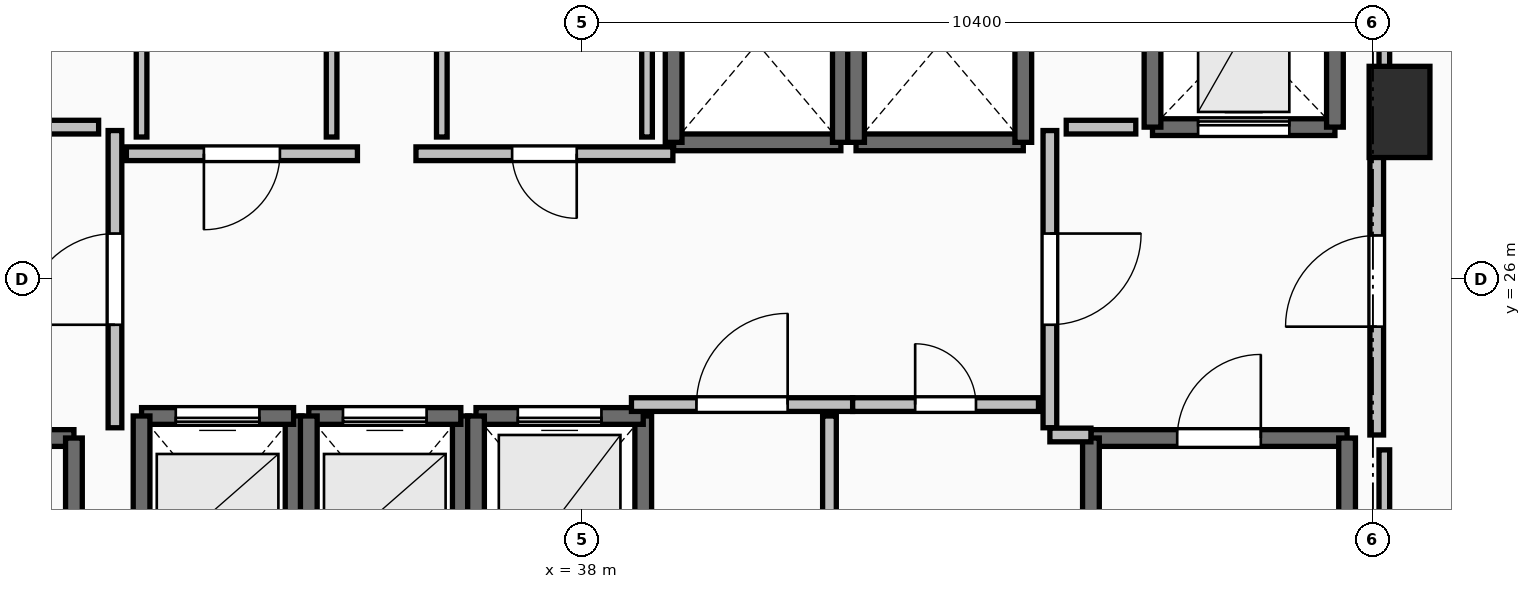
"""IFC4 building model, lengths in metres.
Left out: names, types, materials, properties, quantities, classifications, styles, units other than length and angle.
Written with IfcOpenShell. Run it as: python <this file> out.ifc"""

import sys

from ifc_helpers import new_model, si_unit, direction, frame, frame_2d, origin, origin_2d, place, context, subcontext, project, spatial, rectangle, extrude, element, fill, save


model = new_model("IFC4")
c1 = context("Model", 3, precision=1e-05, world=origin(), true_north=direction((0.0, 1.0)))
c2 = subcontext(c1, "Body", "Model", "MODEL_VIEW")
j1 = project(units=[si_unit("LENGTHUNIT", "METRE"), si_unit("PLANEANGLEUNIT", "RADIAN")], contexts=[c1])
p1 = place(None, origin())
s1 = spatial("IfcSite", under=j1, at=p1, CompositionType="ELEMENT")
p2 = place(p1, origin())
s2 = spatial("IfcBuilding", under=s1, at=p2, CompositionType="ELEMENT")
p3 = place(p2, frame((0.0, 0.0, 146.6)))
s3 = spatial("IfcBuildingStorey", under=s2, at=p3, CompositionType="ELEMENT", Elevation=146.6)
p4 = place(p3, frame((48.75, 28.2, 0.0), z_axis=(0.0, 0.0, 1.0), x_axis=(1.0, 0.0, 0.0)))
e1 = element("IfcColumn", 1, at=p4, inside=s3, PredefinedType="PILASTER", context=c2, shape_type="SweptSolid", body=[
    extrude(rectangle(XDim=0.8, YDim=1.2, at=origin_2d()), origin(), (0.0, 0.0, 1.0), 3.5),
])
p5 = place(p3, frame((27.94, 23.91, 0.0), z_axis=(0.0, 0.0, 1.0), x_axis=(1.0, 0.0, 0.0)))
e2 = element("IfcWall", 2, at=p5, inside=s3, PredefinedType="SOLIDWALL", context=c2, shape_type="SweptSolid", body=[
    extrude(rectangle(XDim=3.37, YDim=0.22, at=frame_2d((1.685, 0.0))), origin(), (0.0, 0.0, 1.0), 3.24),
])
p6 = place(p5, frame((1.135, 0.0, 0.0)))
e3 = element("IfcOpeningElement", 3, at=p6, cuts=e2, PredefinedType="OPENING", context=c2, shape_type="SweptSolid", body=[
    extrude(rectangle(XDim=1.1, YDim=2.15, at=frame_2d((0.55, 1.075))), frame((0.0, 0.125, 0.0), z_axis=(0.0, -1.0, 0.0), x_axis=(1.0, 0.0, 0.0)), (0.0, 0.0, 1.0), 0.25),
])
p7 = place(p3, frame((31.31, 23.91, 0.0), z_axis=(0.0, 0.0, 1.0), x_axis=(0.0, -1.0, 0.0)))
e4 = element("IfcWall", 4, at=p7, inside=s3, PredefinedType="SOLIDWALL", context=c2, shape_type="SweptSolid", body=[
    extrude(rectangle(XDim=7.42, YDim=0.22, at=frame_2d((3.71, 0.0))), origin(), (0.0, 0.0, 1.0), 3.24),
])
p8 = place(p3, frame((44.69, 23.91, 0.0), z_axis=(0.0, 0.0, 1.0), x_axis=(1.0, 0.0, 0.0)))
e5 = element("IfcWall", 5, at=p8, inside=s3, PredefinedType="SOLIDWALL", context=c2, shape_type="SweptSolid", body=[
    extrude(rectangle(XDim=3.37, YDim=0.22, at=frame_2d((1.685, 0.0))), origin(), (0.0, 0.0, 1.0), 3.24),
])
p9 = place(p8, frame((1.135, 0.0, 0.0)))
e6 = element("IfcOpeningElement", 6, at=p9, cuts=e5, PredefinedType="OPENING", context=c2, shape_type="SweptSolid", body=[
    extrude(rectangle(XDim=1.1, YDim=2.15, at=frame_2d((0.55, 1.075))), frame((0.0, 0.125, 0.0), z_axis=(0.0, -1.0, 0.0), x_axis=(1.0, 0.0, 0.0)), (0.0, 0.0, 1.0), 0.25),
])
for number, where, z_axis, x_axis in (
    (7, (48.06, 23.91, 0.0), (0.0, 0.0, 1.0), (0.0, -1.0, 0.0)),
    (8, (44.69, 16.49, 0.0), (0.0, 0.0, 1.0), (0.0, 1.0, 0.0)),
):
    element("IfcWall", number, at=place(p3, frame(where, z_axis=z_axis, x_axis=x_axis)), inside=s3, PredefinedType="SOLIDWALL", context=c2, shape_type="SweptSolid", body=[
        extrude(rectangle(XDim=7.42, YDim=0.22, at=frame_2d((3.71, 0.0))), origin(), (0.0, 0.0, 1.0), 3.24),
    ])
p10 = place(p3, frame((34.2, 21.8, 0.0), z_axis=(0.0, 0.0, 1.0), x_axis=(0.0, 1.0, 0.0)))
e9 = element("IfcWall", 9, at=p10, inside=s3, PredefinedType="SOLIDWALL", context=c2, shape_type="SweptSolid", body=[
    extrude(rectangle(XDim=2.4, YDim=0.22, at=frame_2d((1.2, 0.0))), origin(), (0.0, 0.0, 1.0), 3.24),
])
p11 = place(p3, frame((34.2, 24.2, 0.0), z_axis=(0.0, 0.0, 1.0), x_axis=(-1.0, 0.0, 0.0)))
e10 = element("IfcWall", 10, at=p11, inside=s3, PredefinedType="SOLIDWALL", context=c2, shape_type="SweptSolid", body=[
    extrude(rectangle(XDim=2.0, YDim=0.22, at=frame_2d((1.0, 0.0))), origin(), (0.0, 0.0, 1.0), 3.24),
])
p12 = place(p11, frame((0.45, 0.0, 0.0)))
e11 = element("IfcOpeningElement", 11, at=p12, cuts=e10, PredefinedType="OPENING", context=c2, shape_type="SweptSolid", body=[
    extrude(rectangle(XDim=1.1, YDim=2.2, at=frame_2d((0.55, 1.1))), frame((0.0, 0.125, 0.0), z_axis=(0.0, -1.0, 0.0), x_axis=(1.0, 0.0, 0.0)), (0.0, 0.0, 1.0), 0.25),
])
for number, where, z_axis, x_axis in (
    (12, (32.2, 24.2, 0.0), (0.0, 0.0, 1.0), (0.0, -1.0, 0.0)),
    (13, (36.4, 21.8, 0.0), (0.0, 0.0, 1.0), (0.0, 1.0, 0.0)),
):
    element("IfcWall", number, at=place(p3, frame(where, z_axis=z_axis, x_axis=x_axis)), inside=s3, PredefinedType="SOLIDWALL", context=c2, shape_type="SweptSolid", body=[
        extrude(rectangle(XDim=2.4, YDim=0.22, at=frame_2d((1.2, 0.0))), origin(), (0.0, 0.0, 1.0), 3.24),
    ])
p13 = place(p3, frame((36.4, 24.2, 0.0), z_axis=(0.0, 0.0, 1.0), x_axis=(-1.0, 0.0, 0.0)))
e14 = element("IfcWall", 14, at=p13, inside=s3, PredefinedType="SOLIDWALL", context=c2, shape_type="SweptSolid", body=[
    extrude(rectangle(XDim=2.0, YDim=0.22, at=frame_2d((1.0, 0.0))), origin(), (0.0, 0.0, 1.0), 3.24),
])
p14 = place(p13, frame((0.45, 0.0, 0.0)))
e15 = element("IfcOpeningElement", 15, at=p14, cuts=e14, PredefinedType="OPENING", context=c2, shape_type="SweptSolid", body=[
    extrude(rectangle(XDim=1.1, YDim=2.2, at=frame_2d((0.55, 1.1))), frame((0.0, 0.125, 0.0), z_axis=(0.0, -1.0, 0.0), x_axis=(1.0, 0.0, 0.0)), (0.0, 0.0, 1.0), 0.25),
])
p15 = place(p3, frame((34.4, 24.2, 0.0), z_axis=(0.0, 0.0, 1.0), x_axis=(0.0, -1.0, 0.0)))
e16 = element("IfcWall", 16, at=p15, inside=s3, PredefinedType="SOLIDWALL", context=c2, shape_type="SweptSolid", body=[
    extrude(rectangle(XDim=2.4, YDim=0.22, at=frame_2d((1.2, 0.0))), origin(), (0.0, 0.0, 1.0), 3.24),
])
p16 = place(p3, frame((38.8, 21.6, 0.0), z_axis=(0.0, 0.0, 1.0), x_axis=(0.0, 1.0, 0.0)))
e17 = element("IfcWall", 17, at=p16, inside=s3, PredefinedType="SOLIDWALL", context=c2, shape_type="SweptSolid", body=[
    extrude(rectangle(XDim=2.6, YDim=0.22, at=frame_2d((1.3, 0.0))), origin(), (0.0, 0.0, 1.0), 3.24),
])
p17 = place(p3, frame((38.8, 24.2, 0.0), z_axis=(0.0, 0.0, 1.0), x_axis=(-1.0, 0.0, 0.0)))
e18 = element("IfcWall", 18, at=p17, inside=s3, PredefinedType="SOLIDWALL", context=c2, shape_type="SweptSolid", body=[
    extrude(rectangle(XDim=2.2, YDim=0.22, at=frame_2d((1.1, 0.0))), origin(), (0.0, 0.0, 1.0), 3.24),
])
p18 = place(p17, frame((0.55, 0.0, 0.0)))
e19 = element("IfcOpeningElement", 19, at=p18, cuts=e18, PredefinedType="OPENING", context=c2, shape_type="SweptSolid", body=[
    extrude(rectangle(XDim=1.1, YDim=2.2, at=frame_2d((0.55, 1.1))), frame((0.0, 0.125, 0.0), z_axis=(0.0, -1.0, 0.0), x_axis=(1.0, 0.0, 0.0)), (0.0, 0.0, 1.0), 0.25),
])
p19 = place(p3, frame((36.6, 24.2, 0.0), z_axis=(0.0, 0.0, 1.0), x_axis=(0.0, -1.0, 0.0)))
e20 = element("IfcWall", 20, at=p19, inside=s3, PredefinedType="SOLIDWALL", context=c2, shape_type="SweptSolid", body=[
    extrude(rectangle(XDim=2.6, YDim=0.22, at=frame_2d((1.3, 0.0))), origin(), (0.0, 0.0, 1.0), 3.24),
])
p20 = place(p3, frame((39.2, 27.8, 0.0), z_axis=(0.0, 0.0, 1.0), x_axis=(1.0, 0.0, 0.0)))
e21 = element("IfcWall", 21, at=p20, inside=s3, PredefinedType="SOLIDWALL", context=c2, shape_type="SweptSolid", body=[
    extrude(rectangle(XDim=2.2, YDim=0.22, at=frame_2d((1.1, 0.0))), origin(), (0.0, 0.0, 1.0), 3.24),
])
for number, where, z_axis, x_axis in (
    (22, (41.4, 27.8, 0.0), (0.0, 0.0, 1.0), (0.0, 1.0, 0.0)),
    (23, (39.2, 30.4, 0.0), (0.0, 0.0, 1.0), (0.0, -1.0, 0.0)),
):
    element("IfcWall", number, at=place(p3, frame(where, z_axis=z_axis, x_axis=x_axis)), inside=s3, PredefinedType="SOLIDWALL", context=c2, shape_type="SweptSolid", body=[
        extrude(rectangle(XDim=2.6, YDim=0.22, at=frame_2d((1.3, 0.0))), origin(), (0.0, 0.0, 1.0), 3.24),
    ])
p21 = place(p3, frame((41.6, 27.8, 0.0), z_axis=(0.0, 0.0, 1.0), x_axis=(1.0, 0.0, 0.0)))
e24 = element("IfcWall", 24, at=p21, inside=s3, PredefinedType="SOLIDWALL", context=c2, shape_type="SweptSolid", body=[
    extrude(rectangle(XDim=2.2, YDim=0.22, at=frame_2d((1.1, 0.0))), origin(), (0.0, 0.0, 1.0), 3.24),
])
for number, where, z_axis, x_axis in (
    (25, (43.8, 27.8, 0.0), (0.0, 0.0, 1.0), (0.0, 1.0, 0.0)),
    (26, (41.6, 30.4, 0.0), (0.0, 0.0, 1.0), (0.0, -1.0, 0.0)),
):
    element("IfcWall", number, at=place(p3, frame(where, z_axis=z_axis, x_axis=x_axis)), inside=s3, PredefinedType="SOLIDWALL", context=c2, shape_type="SweptSolid", body=[
        extrude(rectangle(XDim=2.6, YDim=0.22, at=frame_2d((1.3, 0.0))), origin(), (0.0, 0.0, 1.0), 3.24),
    ])
p22 = place(p3, frame((45.5, 28.0, 0.0), z_axis=(0.0, 0.0, 1.0), x_axis=(1.0, 0.0, 0.0)))
e27 = element("IfcWall", 27, at=p22, inside=s3, PredefinedType="SHEAR", context=c2, shape_type="SweptSolid", body=[
    extrude(rectangle(XDim=2.4, YDim=0.22, at=frame_2d((1.2, 0.0))), origin(), (0.0, 0.0, 1.0), 3.24),
])
p23 = place(p22, frame((0.6, 0.0, 0.0)))
e28 = element("IfcOpeningElement", 28, at=p23, cuts=e27, PredefinedType="OPENING", context=c2, shape_type="SweptSolid", body=[
    extrude(rectangle(XDim=1.2, YDim=2.2, at=frame_2d((0.6, 1.1))), frame((0.0, 0.125, 0.0), z_axis=(0.0, -1.0, 0.0), x_axis=(1.0, 0.0, 0.0)), (0.0, 0.0, 1.0), 0.25),
])
for number, where, z_axis, x_axis in (
    (29, (47.9, 28.0, 0.0), (0.0, 0.0, 1.0), (0.0, 1.0, 0.0)),
    (30, (45.5, 30.5, 0.0), (0.0, 0.0, 1.0), (0.0, -1.0, 0.0)),
):
    element("IfcWall", number, at=place(p3, frame(where, z_axis=z_axis, x_axis=x_axis)), inside=s3, PredefinedType="SHEAR", context=c2, shape_type="SweptSolid", body=[
        extrude(rectangle(XDim=2.5, YDim=0.22, at=frame_2d((1.25, 0.0))), origin(), (0.0, 0.0, 1.0), 3.24),
    ])
p24 = place(p3, frame((31.85, 24.045, 0.0), z_axis=(0.0, 0.0, 1.0), x_axis=(0.0, 1.0, 0.0)))
e31 = element("IfcWall", 31, at=p24, inside=s3, PredefinedType="PARTITIONING", context=c2, shape_type="SweptSolid", body=[
    extrude(rectangle(XDim=3.91, YDim=0.18, at=frame_2d((1.955, 0.0))), origin(), (0.0, 0.0, 1.0), 3.24),
])
p25 = place(p24, frame((1.355, 0.0, 0.0)))
e32 = element("IfcOpeningElement", 32, at=p25, cuts=e31, PredefinedType="OPENING", context=c2, shape_type="SweptSolid", body=[
    extrude(rectangle(XDim=1.2, YDim=2.15, at=frame_2d((0.6, 1.075))), frame((0.0, 0.105, 0.0), z_axis=(0.0, -1.0, 0.0), x_axis=(1.0, 0.0, 0.0)), (0.0, 0.0, 1.0), 0.21),
])
p26 = place(p3, frame((44.15, 27.955, 0.0), z_axis=(0.0, 0.0, 1.0), x_axis=(0.0, -1.0, 0.0)))
e33 = element("IfcWall", 33, at=p26, inside=s3, PredefinedType="PARTITIONING", context=c2, shape_type="SweptSolid", body=[
    extrude(rectangle(XDim=3.91, YDim=0.18, at=frame_2d((1.955, 0.0))), origin(), (0.0, 0.0, 1.0), 3.24),
])
p27 = place(p26, frame((1.355, 0.0, 0.0)))
e34 = element("IfcOpeningElement", 34, at=p27, cuts=e33, PredefinedType="OPENING", context=c2, shape_type="SweptSolid", body=[
    extrude(rectangle(XDim=1.2, YDim=2.15, at=frame_2d((0.6, 1.075))), frame((0.0, 0.105, 0.0), z_axis=(0.0, -1.0, 0.0), x_axis=(1.0, 0.0, 0.0)), (0.0, 0.0, 1.0), 0.21),
])
p28 = place(p3, frame((44.15, 23.95, 0.0), z_axis=(0.0, 0.0, 1.0), x_axis=(1.0, 0.0, 0.0)))
e35 = element("IfcWall", 35, at=p28, inside=s3, PredefinedType="PARTITIONING", context=c2, shape_type="SweptSolid", body=[
    extrude(rectangle(XDim=0.54, YDim=0.18, at=frame_2d((0.27, 0.0))), origin(), (0.0, 0.0, 1.0), 3.24),
])
p29 = place(p3, frame((48.45, 23.95, 0.0), z_axis=(0.0, 0.0, 1.0), x_axis=(0.0, 1.0, 0.0)))
e36 = element("IfcWall", 36, at=p29, inside=s3, PredefinedType="PARTITIONING", context=c2, shape_type="SweptSolid", body=[
    extrude(rectangle(XDim=4.05, YDim=0.18, at=frame_2d((2.025, 0.0))), origin(), (0.0, 0.0, 1.0), 3.24),
])
p30 = place(p29, frame((1.425, 0.0, 0.0)))
e37 = element("IfcOpeningElement", 37, at=p30, cuts=e36, PredefinedType="OPENING", context=c2, shape_type="SweptSolid", body=[
    extrude(rectangle(XDim=1.2, YDim=2.15, at=frame_2d((0.6, 1.075))), frame((0.0, 0.105, 0.0), z_axis=(0.0, -1.0, 0.0), x_axis=(1.0, 0.0, 0.0)), (0.0, 0.0, 1.0), 0.21),
])
p31 = place(p3, frame((38.645, 24.35, 0.0), z_axis=(0.0, 0.0, 1.0), x_axis=(1.0, 0.0, 0.0)))
e38 = element("IfcWall", 38, at=p31, inside=s3, PredefinedType="PARTITIONING", context=c2, shape_type="SweptSolid", body=[
    extrude(rectangle(XDim=2.91, YDim=0.18, at=frame_2d((1.455, 0.0))), origin(), (0.0, 0.0, 1.0), 3.24),
])
p32 = place(p31, frame((0.855, 0.0, 0.0)))
e39 = element("IfcOpeningElement", 39, at=p32, cuts=e38, PredefinedType="OPENING", context=c2, shape_type="SweptSolid", body=[
    extrude(rectangle(XDim=1.2, YDim=2.15, at=frame_2d((0.6, 1.075))), frame((0.0, 0.105, 0.0), z_axis=(0.0, -1.0, 0.0), x_axis=(1.0, 0.0, 0.0)), (0.0, 0.0, 1.0), 0.21),
])
p33 = place(p3, frame((41.555, 24.35, 0.0), z_axis=(0.0, 0.0, 1.0), x_axis=(1.0, 0.0, 0.0)))
e40 = element("IfcWall", 40, at=p33, inside=s3, PredefinedType="PARTITIONING", context=c2, shape_type="SweptSolid", body=[
    extrude(rectangle(XDim=2.445, YDim=0.18, at=frame_2d((1.223, 0.0))), origin(), (0.0, 0.0, 1.0), 3.24),
])
p34 = place(p33, frame((0.823, 0.0, 0.0)))
e41 = element("IfcOpeningElement", 41, at=p34, cuts=e40, PredefinedType="OPENING", context=c2, shape_type="SweptSolid", body=[
    extrude(rectangle(XDim=0.8, YDim=2.05, at=frame_2d((0.4, 1.025))), frame((0.0, 0.105, 0.0), z_axis=(0.0, -1.0, 0.0), x_axis=(1.0, 0.0, 0.0)), (0.0, 0.0, 1.0), 0.21),
])
p35 = place(p3, frame((35.04, 27.65, 0.0), z_axis=(0.0, 0.0, 1.0), x_axis=(-1.0, 0.0, 0.0)))
e42 = element("IfcWall", 42, at=p35, inside=s3, PredefinedType="PARTITIONING", context=c2, shape_type="SweptSolid", body=[
    extrude(rectangle(XDim=3.04, YDim=0.18, at=frame_2d((1.52, 0.0))), origin(), (0.0, 0.0, 1.0), 3.24),
])
p36 = place(p35, frame((1.02, 0.0, 0.0)))
e43 = element("IfcOpeningElement", 43, at=p36, cuts=e42, PredefinedType="OPENING", context=c2, shape_type="SweptSolid", body=[
    extrude(rectangle(XDim=1.0, YDim=2.15, at=frame_2d((0.5, 1.075))), frame((0.0, 0.105, 0.0), z_axis=(0.0, -1.0, 0.0), x_axis=(1.0, 0.0, 0.0)), (0.0, 0.0, 1.0), 0.21),
])
p37 = place(p3, frame((39.19, 27.65, 0.0), z_axis=(0.0, 0.0, 1.0), x_axis=(-1.0, 0.0, 0.0)))
e44 = element("IfcWall", 44, at=p37, inside=s3, PredefinedType="PARTITIONING", context=c2, shape_type="SweptSolid", body=[
    extrude(rectangle(XDim=3.38, YDim=0.18, at=frame_2d((1.69, 0.0))), origin(), (0.0, 0.0, 1.0), 3.24),
])
p38 = place(p37, frame((1.265, 0.0, 0.0)))
e45 = element("IfcOpeningElement", 45, at=p38, cuts=e44, PredefinedType="OPENING", context=c2, shape_type="SweptSolid", body=[
    extrude(rectangle(XDim=0.85, YDim=2.1, at=frame_2d((0.425, 1.05))), frame((0.0, 0.105, 0.0), z_axis=(0.0, -1.0, 0.0), x_axis=(1.0, 0.0, 0.0)), (0.0, 0.0, 1.0), 0.21),
])
p39 = place(p3, frame((41.25, 16.32, 0.0), z_axis=(0.0, 0.0, 1.0), x_axis=(0.0, 1.0, 0.0)))
e46 = element("IfcWall", 46, at=p39, inside=s3, PredefinedType="PARTITIONING", context=c2, shape_type="SweptSolid", body=[
    extrude(rectangle(XDim=7.88, YDim=0.18, at=frame_2d((3.94, 0.0))), origin(), (0.0, 0.0, 1.0), 3.24),
])
p40 = place(p39, frame((3.54, 0.0, 0.0)))
e47 = element("IfcOpeningElement", 47, at=p40, cuts=e46, PredefinedType="OPENING", context=c2, shape_type="SweptSolid", body=[
    extrude(rectangle(XDim=0.8, YDim=2.05, at=frame_2d((0.4, 1.025))), frame((0.0, 0.105, 0.0), z_axis=(0.0, -1.0, 0.0), x_axis=(1.0, 0.0, 0.0)), (0.0, 0.0, 1.0), 0.21),
])
for number, where, z_axis, x_axis in (
    (48, (31.635, 28.0, 0.0), (0.0, 0.0, 1.0), (-1.0, 0.0, 0.0)),
    (49, (45.28, 28.0, 0.0), (0.0, 0.0, 1.0), (-1.0, 0.0, 0.0)),
):
    element("IfcWall", number, at=place(p3, frame(where, z_axis=z_axis, x_axis=x_axis)), inside=s3, PredefinedType="PARTITIONING", context=c2, shape_type="SweptSolid", body=[
        extrude(rectangle(XDim=0.915, YDim=0.18, at=frame_2d((0.458, 0.0))), origin(), (0.0, 0.0, 1.0), 3.24),
    ])
for number, where, z_axis, x_axis in (
    (50, (32.2, 30.26, 0.0), (0.0, 0.0, 1.0), (0.0, -1.0, 0.0)),
    (51, (34.7, 27.87, 0.0), (0.0, 0.0, 1.0), (0.0, 1.0, 0.0)),
):
    element("IfcWall", number, at=place(p3, frame(where, z_axis=z_axis, x_axis=x_axis)), inside=s3, PredefinedType="PARTITIONING", context=c2, shape_type="SweptSolid", body=[
        extrude(rectangle(XDim=2.39, YDim=0.14, at=frame_2d((1.195, 0.0))), origin(), (0.0, 0.0, 1.0), 3.24),
    ])
p41 = place(p3, frame((36.15, 30.03, 0.0), z_axis=(0.0, 0.0, 1.0), x_axis=(0.0, -1.0, 0.0)))
e52 = element("IfcWall", 52, at=p41, inside=s3, PredefinedType="PARTITIONING", context=c2, shape_type="SweptSolid", body=[
    extrude(rectangle(XDim=2.16, YDim=0.14, at=frame_2d((1.08, 0.0))), origin(), (0.0, 0.0, 1.0), 3.24),
])
p42 = place(p3, frame((38.85, 27.87, 0.0), z_axis=(0.0, 0.0, 1.0), x_axis=(0.0, 1.0, 0.0)))
e53 = element("IfcWall", 53, at=p42, inside=s3, PredefinedType="PARTITIONING", context=c2, shape_type="SweptSolid", body=[
    extrude(rectangle(XDim=2.39, YDim=0.14, at=frame_2d((1.195, 0.0))), origin(), (0.0, 0.0, 1.0), 3.24),
])
p43 = place(p3, frame((48.55, 16.24, 0.0), z_axis=(0.0, 0.0, 1.0), x_axis=(0.0, 1.0, 0.0)))
e54 = element("IfcWall", 54, at=p43, inside=s3, PredefinedType="PARTITIONING", context=c2, shape_type="SweptSolid", body=[
    extrude(rectangle(XDim=7.514, YDim=0.14, at=frame_2d((3.757, 0.0))), origin(), (0.0, 0.0, 1.0), 2.432),
])
p44 = place(p3, frame((48.55, 28.196, 0.0), z_axis=(0.0, 0.0, 1.0), x_axis=(0.0, 1.0, 0.0)))
e55 = element("IfcWall", 55, at=p44, inside=s3, PredefinedType="PARTITIONING", context=c2, shape_type="SweptSolid", body=[
    extrude(rectangle(XDim=5.254, YDim=0.14, at=frame_2d((2.627, 0.0))), origin(), (0.0, 0.0, 1.0), 2.432),
])
p45 = place(p9, origin())
e56 = element("IfcDoor", 56, at=p45, inside=s3, OperationType="SINGLE_SWING_RIGHT", PredefinedType="DOOR", context=c2, shape_type="SweptSolid", body=[
    extrude(rectangle(XDim=1.1, YDim=2.15, at=frame_2d((0.55, 1.075))), frame((0.0, 0.025, 0.0), z_axis=(0.0, -1.0, 0.0), x_axis=(1.0, 0.0, 0.0)), (0.0, 0.0, 1.0), 0.05),
])
fill(e6, e56)
p46 = place(p12, origin())
e57 = element("IfcDoor", 57, at=p46, inside=s3, OperationType="SLIDING_TO_LEFT", PredefinedType="DOOR", context=c2, shape_type="SweptSolid", body=[
    extrude(rectangle(XDim=1.1, YDim=2.2, at=frame_2d((0.55, 1.1))), frame((0.0, 0.025, 0.0), z_axis=(0.0, -1.0, 0.0), x_axis=(1.0, 0.0, 0.0)), (0.0, 0.0, 1.0), 0.05),
])
fill(e11, e57)
p47 = place(p14, origin())
e58 = element("IfcDoor", 58, at=p47, inside=s3, OperationType="SLIDING_TO_LEFT", PredefinedType="DOOR", context=c2, shape_type="SweptSolid", body=[
    extrude(rectangle(XDim=1.1, YDim=2.2, at=frame_2d((0.55, 1.1))), frame((0.0, 0.025, 0.0), z_axis=(0.0, -1.0, 0.0), x_axis=(1.0, 0.0, 0.0)), (0.0, 0.0, 1.0), 0.05),
])
fill(e15, e58)
p48 = place(p18, origin())
e59 = element("IfcDoor", 59, at=p48, inside=s3, OperationType="SLIDING_TO_LEFT", PredefinedType="DOOR", context=c2, shape_type="SweptSolid", body=[
    extrude(rectangle(XDim=1.1, YDim=2.2, at=frame_2d((0.55, 1.1))), frame((0.0, 0.025, 0.0), z_axis=(0.0, -1.0, 0.0), x_axis=(1.0, 0.0, 0.0)), (0.0, 0.0, 1.0), 0.05),
])
fill(e19, e59)
p49 = place(p23, origin())
e60 = element("IfcDoor", 60, at=p49, inside=s3, OperationType="SLIDING_TO_LEFT", PredefinedType="DOOR", context=c2, shape_type="SweptSolid", body=[
    extrude(rectangle(XDim=1.2, YDim=2.2, at=frame_2d((0.6, 1.1))), frame((0.0, 0.025, 0.0), z_axis=(0.0, -1.0, 0.0), x_axis=(1.0, 0.0, 0.0)), (0.0, 0.0, 1.0), 0.05),
])
fill(e28, e60)
p50 = place(p25, origin())
e61 = element("IfcDoor", 61, at=p50, inside=s3, OperationType="SINGLE_SWING_LEFT", PredefinedType="DOOR", context=c2, shape_type="SweptSolid", body=[
    extrude(rectangle(XDim=1.2, YDim=2.15, at=frame_2d((0.6, 1.075))), frame((0.0, 0.025, 0.0), z_axis=(0.0, -1.0, 0.0), x_axis=(1.0, 0.0, 0.0)), (0.0, 0.0, 1.0), 0.05),
])
fill(e32, e61)
p51 = place(p27, origin())
e62 = element("IfcDoor", 62, at=p51, inside=s3, OperationType="SINGLE_SWING_LEFT", PredefinedType="DOOR", context=c2, shape_type="SweptSolid", body=[
    extrude(rectangle(XDim=1.2, YDim=2.15, at=frame_2d((0.6, 1.075))), frame((0.0, 0.025, 0.0), z_axis=(0.0, -1.0, 0.0), x_axis=(1.0, 0.0, 0.0)), (0.0, 0.0, 1.0), 0.05),
])
fill(e34, e62)
p52 = place(p30, origin())
e63 = element("IfcDoor", 63, at=p52, inside=s3, OperationType="SINGLE_SWING_LEFT", PredefinedType="DOOR", context=c2, shape_type="SweptSolid", body=[
    extrude(rectangle(XDim=1.2, YDim=2.15, at=frame_2d((0.6, 1.075))), frame((0.0, 0.025, 0.0), z_axis=(0.0, -1.0, 0.0), x_axis=(1.0, 0.0, 0.0)), (0.0, 0.0, 1.0), 0.05),
])
fill(e37, e63)
p53 = place(p32, origin())
e64 = element("IfcDoor", 64, at=p53, inside=s3, OperationType="SINGLE_SWING_RIGHT", PredefinedType="DOOR", context=c2, shape_type="SweptSolid", body=[
    extrude(rectangle(XDim=1.2, YDim=2.15, at=frame_2d((0.6, 1.075))), frame((0.0, 0.025, 0.0), z_axis=(0.0, -1.0, 0.0), x_axis=(1.0, 0.0, 0.0)), (0.0, 0.0, 1.0), 0.05),
])
fill(e39, e64)
p54 = place(p34, origin())
e65 = element("IfcDoor", 65, at=p54, inside=s3, OperationType="SINGLE_SWING_LEFT", PredefinedType="DOOR", context=c2, shape_type="SweptSolid", body=[
    extrude(rectangle(XDim=0.8, YDim=2.05, at=frame_2d((0.4, 1.025))), frame((0.0, 0.025, 0.0), z_axis=(0.0, -1.0, 0.0), x_axis=(1.0, 0.0, 0.0)), (0.0, 0.0, 1.0), 0.05),
])
fill(e41, e65)
p55 = place(p36, origin())
e66 = element("IfcDoor", 66, at=p55, inside=s3, OperationType="SINGLE_SWING_RIGHT", PredefinedType="DOOR", context=c2, shape_type="SweptSolid", body=[
    extrude(rectangle(XDim=1.0, YDim=2.15, at=frame_2d((0.5, 1.075))), frame((0.0, 0.025, 0.0), z_axis=(0.0, -1.0, 0.0), x_axis=(1.0, 0.0, 0.0)), (0.0, 0.0, 1.0), 0.05),
])
fill(e43, e66)
p56 = place(p38, origin())
e67 = element("IfcDoor", 67, at=p56, inside=s3, OperationType="SINGLE_SWING_LEFT", PredefinedType="DOOR", context=c2, shape_type="SweptSolid", body=[
    extrude(rectangle(XDim=0.85, YDim=2.1, at=frame_2d((0.425, 1.05))), frame((0.0, 0.025, 0.0), z_axis=(0.0, -1.0, 0.0), x_axis=(1.0, 0.0, 0.0)), (0.0, 0.0, 1.0), 0.05),
])
fill(e45, e67)
save(model, sys.argv[1])
